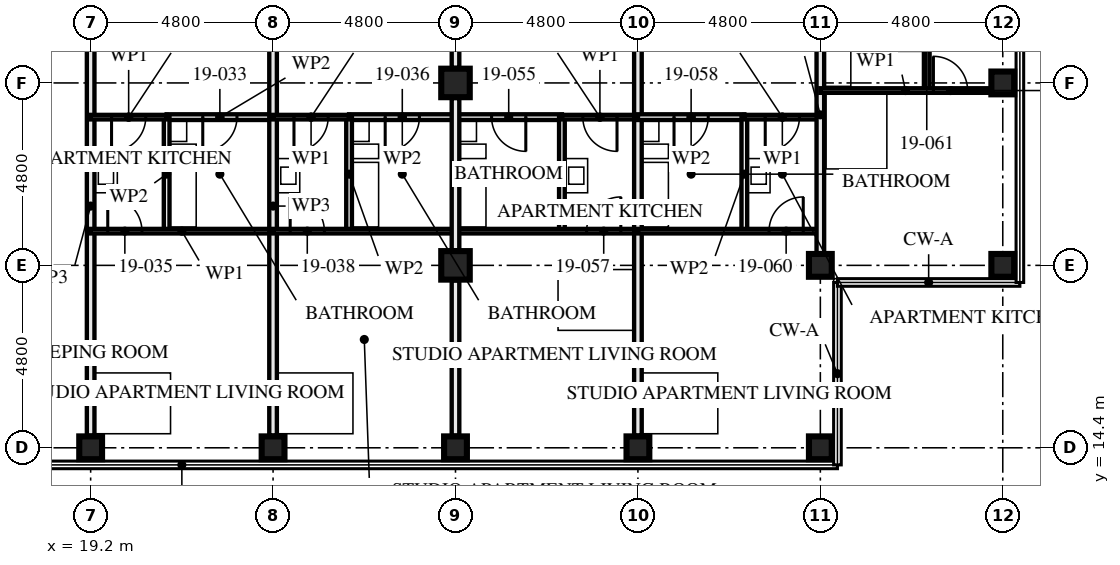
"""IFC4 building model, lengths in metres.
Left out: names, types, materials, properties, quantities, classifications, styles, units other than length and angle.
Written with IfcOpenShell. Run it as: python <this file> out.ifc"""

import sys

from ifc_helpers import new_model, si_unit, direction, frame, frame_2d, origin, origin_2d, place, context, subcontext, project, spatial, rectangle, hollow_rectangle, extrude, element, fill, save


model = new_model("IFC4")
c1 = context("Model", 3, precision=1e-05, world=origin(), true_north=direction((0.0, 1.0)))
c2 = subcontext(c1, "Body", "Model", "MODEL_VIEW")
j1 = project(units=[si_unit("LENGTHUNIT", "METRE"), si_unit("PLANEANGLEUNIT", "RADIAN")], contexts=[c1])
p1 = place(None, origin())
s1 = spatial("IfcSite", under=j1, at=p1, CompositionType="ELEMENT")
p2 = place(p1, origin())
s2 = spatial("IfcBuilding", under=s1, at=p2, CompositionType="ELEMENT")
p3 = place(p2, frame((0.0, 0.0, 72.5)))
s3 = spatial("IfcBuildingStorey", under=s2, at=p3, CompositionType="ELEMENT", Elevation=72.5)
for number, where, z_axis, x_axis in (
    (1, (19.2, 14.4, 0.0), (0.0, 0.0, 1.0), (0.0, 1.0, 0.0)),
    (2, (24.0, 14.4, 0.0), (0.0, 0.0, 1.0), (0.0, 1.0, 0.0)),
    (3, (28.8, 14.4, 0.0), (0.0, 0.0, 1.0), (0.0, 1.0, 0.0)),
):
    element("IfcColumn", number, at=place(p3, frame(where, z_axis=z_axis, x_axis=x_axis)), inside=s3, PredefinedType="COLUMN", context=c2, shape_type="SweptSolid", body=[
        extrude(hollow_rectangle(XDim=0.6, YDim=0.6, WallThickness=0.08, at=origin_2d()), origin(), (0.0, 0.0, 1.0), 3.5),
    ])
for number, where, z_axis, x_axis in (
    (4, (28.8, 19.2, 0.0), (0.0, 0.0, 1.0), (1.0, 0.0, 0.0)),
    (5, (28.8, 24.0, 0.0), (0.0, 0.0, 1.0), (1.0, 0.0, 0.0)),
):
    element("IfcColumn", number, at=place(p3, frame(where, z_axis=z_axis, x_axis=x_axis)), inside=s3, PredefinedType="COLUMN", context=c2, shape_type="SweptSolid", body=[
        extrude(hollow_rectangle(XDim=0.75, YDim=0.75, WallThickness=0.08, at=origin_2d()), origin(), (0.0, 0.0, 1.0), 3.5),
    ])
for number, where, z_axis, x_axis in (
    (6, (33.6, 14.4, 0.0), (0.0, 0.0, 1.0), (0.0, 1.0, 0.0)),
    (7, (38.4, 14.4, 0.0), (0.0, 0.0, 1.0), (0.0, 1.0, 0.0)),
    (8, (38.4, 19.2, 0.0), (0.0, 0.0, 1.0), (0.0, 1.0, 0.0)),
    (9, (43.2, 19.2, 0.0), (0.0, 0.0, 1.0), (0.0, 1.0, 0.0)),
    (10, (43.2, 24.0, 0.0), (0.0, 0.0, 1.0), (1.0, 0.0, 0.0)),
):
    element("IfcColumn", number, at=place(p3, frame(where, z_axis=z_axis, x_axis=x_axis)), inside=s3, PredefinedType="COLUMN", context=c2, shape_type="SweptSolid", body=[
        extrude(hollow_rectangle(XDim=0.6, YDim=0.6, WallThickness=0.08, at=origin_2d()), origin(), (0.0, 0.0, 1.0), 3.5),
    ])
p4 = place(p3, frame((19.2, 14.72, 0.0), z_axis=(0.0, 0.0, 1.0), x_axis=(0.0, 1.0, 0.0)))
e11 = element("IfcWall", 11, at=p4, inside=s3, PredefinedType="PARTITIONING", context=c2, shape_type="SweptSolid", body=[
    extrude(rectangle(XDim=12.08, YDim=0.2, at=frame_2d((6.04, 0.0))), origin(), (0.0, 0.0, 1.0), 2.55),
])
p5 = place(p3, frame((21.2, 20.1, 0.0), z_axis=(0.0, 0.0, 1.0), x_axis=(0.0, 1.0, 0.0)))
e12 = element("IfcWall", 12, at=p5, inside=s3, PredefinedType="PARTITIONING", context=c2, shape_type="SweptSolid", body=[
    extrude(rectangle(XDim=3.0, YDim=0.15, at=frame_2d((1.5, 0.0))), origin(), (0.0, 0.0, 1.0), 3.33),
])
p6 = place(p3, frame((21.2, 23.1, 0.0), z_axis=(0.0, 0.0, 1.0), x_axis=(1.0, 0.0, 0.0)))
e13 = element("IfcWall", 13, at=p6, inside=s3, PredefinedType="PARTITIONING", context=c2, shape_type="SweptSolid", body=[
    extrude(rectangle(XDim=2.8, YDim=0.15, at=frame_2d((1.4, 0.0))), origin(), (0.0, 0.0, 1.0), 3.33),
])
p7 = place(p6, frame((0.95, 0.0, 0.0)))
e14 = element("IfcOpeningElement", 14, at=p7, cuts=e13, PredefinedType="OPENING", context=c2, shape_type="SweptSolid", body=[
    extrude(rectangle(XDim=0.9, YDim=2.1, at=frame_2d((0.45, 1.05))), frame((0.0, 0.085, 0.0), z_axis=(0.0, -1.0, 0.0), x_axis=(1.0, 0.0, 0.0)), (0.0, 0.0, 1.0), 0.171),
])
p8 = place(p3, frame((19.2, 23.1, 0.0), z_axis=(0.0, 0.0, 1.0), x_axis=(1.0, 0.0, 0.0)))
e15 = element("IfcWall", 15, at=p8, inside=s3, PredefinedType="PARTITIONING", context=c2, shape_type="SweptSolid", body=[
    extrude(rectangle(XDim=2.0, YDim=0.12, at=frame_2d((1.0, 0.0))), origin(), (0.0, 0.0, 1.0), 3.33),
])
p9 = place(p8, frame((0.55, 0.0, 0.0)))
e16 = element("IfcOpeningElement", 16, at=p9, cuts=e15, PredefinedType="OPENING", context=c2, shape_type="SweptSolid", body=[
    extrude(rectangle(XDim=0.9, YDim=2.1, at=frame_2d((0.45, 1.05))), frame((0.0, 0.071, 0.0), z_axis=(0.0, -1.0, 0.0), x_axis=(1.0, 0.0, 0.0)), (0.0, 0.0, 1.0), 0.141),
])
p10 = place(p3, frame((19.2, 20.1, 0.0), z_axis=(0.0, 0.0, 1.0), x_axis=(1.0, 0.0, 0.0)))
e17 = element("IfcWall", 17, at=p10, inside=s3, PredefinedType="PARTITIONING", context=c2, shape_type="SweptSolid", body=[
    extrude(rectangle(XDim=4.8, YDim=0.12, at=frame_2d((2.4, 0.0))), origin(), (0.0, 0.0, 1.0), 3.33),
])
p11 = place(p10, frame((0.45, 0.0, 0.0)))
e18 = element("IfcOpeningElement", 18, at=p11, cuts=e17, PredefinedType="OPENING", context=c2, shape_type="SweptSolid", body=[
    extrude(rectangle(XDim=0.9, YDim=2.1, at=frame_2d((0.45, 1.05))), frame((0.0, 0.071, 0.0), z_axis=(0.0, -1.0, 0.0), x_axis=(1.0, 0.0, 0.0)), (0.0, 0.0, 1.0), 0.141),
])
p12 = place(p3, frame((24.0, 14.72, 0.0), z_axis=(0.0, 0.0, 1.0), x_axis=(0.0, 1.0, 0.0)))
e19 = element("IfcWall", 19, at=p12, inside=s3, PredefinedType="PARTITIONING", context=c2, shape_type="SweptSolid", body=[
    extrude(rectangle(XDim=12.08, YDim=0.2, at=frame_2d((6.04, 0.0))), origin(), (0.0, 0.0, 1.0), 2.55),
])
p13 = place(p3, frame((26.0, 20.1, 0.0), z_axis=(0.0, 0.0, 1.0), x_axis=(0.0, 1.0, 0.0)))
e20 = element("IfcWall", 20, at=p13, inside=s3, PredefinedType="PARTITIONING", context=c2, shape_type="SweptSolid", body=[
    extrude(rectangle(XDim=3.0, YDim=0.15, at=frame_2d((1.5, 0.0))), origin(), (0.0, 0.0, 1.0), 3.33),
])
p14 = place(p3, frame((26.0, 23.1, 0.0), z_axis=(0.0, 0.0, 1.0), x_axis=(1.0, 0.0, 0.0)))
e21 = element("IfcWall", 21, at=p14, inside=s3, PredefinedType="PARTITIONING", context=c2, shape_type="SweptSolid", body=[
    extrude(rectangle(XDim=2.8, YDim=0.15, at=frame_2d((1.4, 0.0))), origin(), (0.0, 0.0, 1.0), 3.33),
])
p15 = place(p14, frame((0.95, 0.0, 0.0)))
e22 = element("IfcOpeningElement", 22, at=p15, cuts=e21, PredefinedType="OPENING", context=c2, shape_type="SweptSolid", body=[
    extrude(rectangle(XDim=0.9, YDim=2.1, at=frame_2d((0.45, 1.05))), frame((0.0, 0.085, 0.0), z_axis=(0.0, -1.0, 0.0), x_axis=(1.0, 0.0, 0.0)), (0.0, 0.0, 1.0), 0.171),
])
p16 = place(p3, frame((24.0, 23.1, 0.0), z_axis=(0.0, 0.0, 1.0), x_axis=(1.0, 0.0, 0.0)))
e23 = element("IfcWall", 23, at=p16, inside=s3, PredefinedType="PARTITIONING", context=c2, shape_type="SweptSolid", body=[
    extrude(rectangle(XDim=2.0, YDim=0.12, at=frame_2d((1.0, 0.0))), origin(), (0.0, 0.0, 1.0), 3.33),
])
p17 = place(p16, frame((0.55, 0.0, 0.0)))
e24 = element("IfcOpeningElement", 24, at=p17, cuts=e23, PredefinedType="OPENING", context=c2, shape_type="SweptSolid", body=[
    extrude(rectangle(XDim=0.9, YDim=2.1, at=frame_2d((0.45, 1.05))), frame((0.0, 0.071, 0.0), z_axis=(0.0, -1.0, 0.0), x_axis=(1.0, 0.0, 0.0)), (0.0, 0.0, 1.0), 0.141),
])
p18 = place(p3, frame((24.0, 20.1, 0.0), z_axis=(0.0, 0.0, 1.0), x_axis=(1.0, 0.0, 0.0)))
e25 = element("IfcWall", 25, at=p18, inside=s3, PredefinedType="PARTITIONING", context=c2, shape_type="SweptSolid", body=[
    extrude(rectangle(XDim=4.8, YDim=0.12, at=frame_2d((2.4, 0.0))), origin(), (0.0, 0.0, 1.0), 3.33),
])
p19 = place(p18, frame((0.45, 0.0, 0.0)))
e26 = element("IfcOpeningElement", 26, at=p19, cuts=e25, PredefinedType="OPENING", context=c2, shape_type="SweptSolid", body=[
    extrude(rectangle(XDim=0.9, YDim=2.1, at=frame_2d((0.45, 1.05))), frame((0.0, 0.071, 0.0), z_axis=(0.0, -1.0, 0.0), x_axis=(1.0, 0.0, 0.0)), (0.0, 0.0, 1.0), 0.141),
])
p20 = place(p3, frame((31.6, 20.1, 0.0), z_axis=(0.0, 0.0, 1.0), x_axis=(0.0, 1.0, 0.0)))
e27 = element("IfcWall", 27, at=p20, inside=s3, PredefinedType="PARTITIONING", context=c2, shape_type="SweptSolid", body=[
    extrude(rectangle(XDim=3.0, YDim=0.15, at=frame_2d((1.5, 0.0))), origin(), (0.0, 0.0, 1.0), 3.33),
])
p21 = place(p3, frame((28.8, 23.1, 0.0), z_axis=(0.0, 0.0, 1.0), x_axis=(1.0, 0.0, 0.0)))
e28 = element("IfcWall", 28, at=p21, inside=s3, PredefinedType="PARTITIONING", context=c2, shape_type="SweptSolid", body=[
    extrude(rectangle(XDim=2.8, YDim=0.15, at=frame_2d((1.4, 0.0))), origin(), (0.0, 0.0, 1.0), 3.33),
])
p22 = place(p21, frame((0.95, 0.0, 0.0)))
e29 = element("IfcOpeningElement", 29, at=p22, cuts=e28, PredefinedType="OPENING", context=c2, shape_type="SweptSolid", body=[
    extrude(rectangle(XDim=0.9, YDim=2.1, at=frame_2d((0.45, 1.05))), frame((0.0, 0.085, 0.0), z_axis=(0.0, -1.0, 0.0), x_axis=(1.0, 0.0, 0.0)), (0.0, 0.0, 1.0), 0.171),
])
p23 = place(p3, frame((31.6, 23.1, 0.0), z_axis=(0.0, 0.0, 1.0), x_axis=(1.0, 0.0, 0.0)))
e30 = element("IfcWall", 30, at=p23, inside=s3, PredefinedType="PARTITIONING", context=c2, shape_type="SweptSolid", body=[
    extrude(rectangle(XDim=2.0, YDim=0.12, at=frame_2d((1.0, 0.0))), origin(), (0.0, 0.0, 1.0), 3.33),
])
p24 = place(p23, frame((0.55, 0.0, 0.0)))
e31 = element("IfcOpeningElement", 31, at=p24, cuts=e30, PredefinedType="OPENING", context=c2, shape_type="SweptSolid", body=[
    extrude(rectangle(XDim=0.9, YDim=2.1, at=frame_2d((0.45, 1.05))), frame((0.0, 0.071, 0.0), z_axis=(0.0, -1.0, 0.0), x_axis=(1.0, 0.0, 0.0)), (0.0, 0.0, 1.0), 0.141),
])
p25 = place(p3, frame((28.8, 20.1, 0.0), z_axis=(0.0, 0.0, 1.0), x_axis=(1.0, 0.0, 0.0)))
e32 = element("IfcWall", 32, at=p25, inside=s3, PredefinedType="PARTITIONING", context=c2, shape_type="SweptSolid", body=[
    extrude(rectangle(XDim=4.8, YDim=0.12, at=frame_2d((2.4, 0.0))), origin(), (0.0, 0.0, 1.0), 3.33),
])
p26 = place(p25, frame((3.45, 0.0, 0.0)))
e33 = element("IfcOpeningElement", 33, at=p26, cuts=e32, PredefinedType="OPENING", context=c2, shape_type="SweptSolid", body=[
    extrude(rectangle(XDim=0.9, YDim=2.1, at=frame_2d((0.45, 1.05))), frame((0.0, 0.071, 0.0), z_axis=(0.0, -1.0, 0.0), x_axis=(1.0, 0.0, 0.0)), (0.0, 0.0, 1.0), 0.141),
])
p27 = place(p3, frame((33.6, 14.72, 0.0), z_axis=(0.0, 0.0, 1.0), x_axis=(0.0, 1.0, 0.0)))
e34 = element("IfcWall", 34, at=p27, inside=s3, PredefinedType="PARTITIONING", context=c2, shape_type="SweptSolid", body=[
    extrude(rectangle(XDim=12.08, YDim=0.2, at=frame_2d((6.04, 0.0))), origin(), (0.0, 0.0, 1.0), 2.55),
])
p28 = place(p3, frame((36.4, 20.1, 0.0), z_axis=(0.0, 0.0, 1.0), x_axis=(0.0, 1.0, 0.0)))
e35 = element("IfcWall", 35, at=p28, inside=s3, PredefinedType="PARTITIONING", context=c2, shape_type="SweptSolid", body=[
    extrude(rectangle(XDim=3.0, YDim=0.15, at=frame_2d((1.5, 0.0))), origin(), (0.0, 0.0, 1.0), 3.33),
])
p29 = place(p3, frame((33.6, 23.1, 0.0), z_axis=(0.0, 0.0, 1.0), x_axis=(1.0, 0.0, 0.0)))
e36 = element("IfcWall", 36, at=p29, inside=s3, PredefinedType="PARTITIONING", context=c2, shape_type="SweptSolid", body=[
    extrude(rectangle(XDim=2.8, YDim=0.15, at=frame_2d((1.4, 0.0))), origin(), (0.0, 0.0, 1.0), 3.33),
])
p30 = place(p29, frame((0.95, 0.0, 0.0)))
e37 = element("IfcOpeningElement", 37, at=p30, cuts=e36, PredefinedType="OPENING", context=c2, shape_type="SweptSolid", body=[
    extrude(rectangle(XDim=0.9, YDim=2.1, at=frame_2d((0.45, 1.05))), frame((0.0, 0.085, 0.0), z_axis=(0.0, -1.0, 0.0), x_axis=(1.0, 0.0, 0.0)), (0.0, 0.0, 1.0), 0.171),
])
p31 = place(p3, frame((36.4, 23.1, 0.0), z_axis=(0.0, 0.0, 1.0), x_axis=(1.0, 0.0, 0.0)))
e38 = element("IfcWall", 38, at=p31, inside=s3, PredefinedType="PARTITIONING", context=c2, shape_type="SweptSolid", body=[
    extrude(rectangle(XDim=2.0, YDim=0.12, at=frame_2d((1.0, 0.0))), origin(), (0.0, 0.0, 1.0), 3.33),
])
p32 = place(p31, frame((0.55, 0.0, 0.0)))
e39 = element("IfcOpeningElement", 39, at=p32, cuts=e38, PredefinedType="OPENING", context=c2, shape_type="SweptSolid", body=[
    extrude(rectangle(XDim=0.9, YDim=2.1, at=frame_2d((0.45, 1.05))), frame((0.0, 0.071, 0.0), z_axis=(0.0, -1.0, 0.0), x_axis=(1.0, 0.0, 0.0)), (0.0, 0.0, 1.0), 0.141),
])
p33 = place(p3, frame((33.6, 20.1, 0.0), z_axis=(0.0, 0.0, 1.0), x_axis=(1.0, 0.0, 0.0)))
e40 = element("IfcWall", 40, at=p33, inside=s3, PredefinedType="PARTITIONING", context=c2, shape_type="SweptSolid", body=[
    extrude(rectangle(XDim=4.8, YDim=0.12, at=frame_2d((2.4, 0.0))), origin(), (0.0, 0.0, 1.0), 3.33),
])
p34 = place(p33, frame((3.45, 0.0, 0.0)))
e41 = element("IfcOpeningElement", 41, at=p34, cuts=e40, PredefinedType="OPENING", context=c2, shape_type="SweptSolid", body=[
    extrude(rectangle(XDim=0.9, YDim=2.1, at=frame_2d((0.45, 1.05))), frame((0.0, 0.071, 0.0), z_axis=(0.0, -1.0, 0.0), x_axis=(1.0, 0.0, 0.0)), (0.0, 0.0, 1.0), 0.141),
])
p35 = place(p3, frame((38.4, 19.52, 0.0), z_axis=(0.0, 0.0, 1.0), x_axis=(0.0, 1.0, 0.0)))
e42 = element("IfcWall", 42, at=p35, inside=s3, PredefinedType="PARTITIONING", context=c2, shape_type="SweptSolid", body=[
    extrude(rectangle(XDim=7.28, YDim=0.2, at=frame_2d((3.64, 0.0))), origin(), (0.0, 0.0, 1.0), 2.55),
])
p36 = place(p3, frame((41.2, 23.8, 0.0), z_axis=(0.0, 0.0, 1.0), x_axis=(0.0, 1.0, 0.0)))
e43 = element("IfcWall", 43, at=p36, inside=s3, PredefinedType="PARTITIONING", context=c2, shape_type="SweptSolid", body=[
    extrude(rectangle(XDim=3.0, YDim=0.15, at=frame_2d((1.5, 0.0))), origin(), (0.0, 0.0, 1.0), 2.55),
])
p37 = place(p36, frame((1.05, 0.0, 0.0)))
e44 = element("IfcOpeningElement", 44, at=p37, cuts=e43, PredefinedType="OPENING", context=c2, shape_type="SweptSolid", body=[
    extrude(rectangle(XDim=0.9, YDim=2.1, at=frame_2d((0.45, 1.05))), frame((0.0, 0.085, 0.0), z_axis=(0.0, -1.0, 0.0), x_axis=(1.0, 0.0, 0.0)), (0.0, 0.0, 1.0), 0.171),
])
p38 = place(p3, frame((38.4, 23.8, 0.0), z_axis=(0.0, 0.0, 1.0), x_axis=(1.0, 0.0, 0.0)))
e45 = element("IfcWall", 45, at=p38, inside=s3, PredefinedType="PARTITIONING", context=c2, shape_type="SweptSolid", body=[
    extrude(rectangle(XDim=4.48, YDim=0.12, at=frame_2d((2.24, 0.0))), origin(), (0.0, 0.0, 1.0), 3.33),
])
p39 = place(p38, frame((2.975, 0.0, 0.0)))
e46 = element("IfcOpeningElement", 46, at=p39, cuts=e45, PredefinedType="OPENING", context=c2, shape_type="SweptSolid", body=[
    extrude(rectangle(XDim=0.9, YDim=2.1, at=frame_2d((0.45, 1.05))), frame((0.0, 0.071, 0.0), z_axis=(0.0, -1.0, 0.0), x_axis=(1.0, 0.0, 0.0)), (0.0, 0.0, 1.0), 0.141),
])
p40 = place(p3, frame((28.8, 14.72, 0.0), z_axis=(0.0, 0.0, 1.0), x_axis=(0.0, 1.0, 0.0)))
e47 = element("IfcWall", 47, at=p40, inside=s3, PredefinedType="PARTITIONING", context=c2, shape_type="SweptSolid", body=[
    extrude(rectangle(XDim=4.085, YDim=0.2, at=frame_2d((2.042, 0.0))), origin(), (0.0, 0.0, 1.0), 2.32),
])
p41 = place(p3, frame((28.8, 19.595, 0.0), z_axis=(0.0, 0.0, 1.0), x_axis=(0.0, 1.0, 0.0)))
e48 = element("IfcWall", 48, at=p41, inside=s3, PredefinedType="PARTITIONING", context=c2, shape_type="SweptSolid", body=[
    extrude(rectangle(XDim=4.01, YDim=0.2, at=frame_2d((2.005, 0.0))), origin(), (0.0, 0.0, 1.0), 2.32),
])
p42 = place(p3, frame((28.8, 24.395, 0.0), z_axis=(0.0, 0.0, 1.0), x_axis=(0.0, 1.0, 0.0)))
e49 = element("IfcWall", 49, at=p42, inside=s3, PredefinedType="PARTITIONING", context=c2, shape_type="SweptSolid", body=[
    extrude(rectangle(XDim=2.505, YDim=0.2, at=frame_2d((1.252, 0.0))), origin(), (0.0, 0.0, 1.0), 2.32),
])
p43 = place(p7, frame((0.9, 0.0, 0.0), z_axis=(0.0, 0.0, 1.0), x_axis=(-1.0, 0.0, 0.0)))
e50 = element("IfcDoor", 50, at=p43, inside=s3, OperationType="SINGLE_SWING_LEFT", PredefinedType="DOOR", context=c2, shape_type="SweptSolid", body=[
    extrude(rectangle(XDim=0.9, YDim=2.1, at=frame_2d((0.45, 1.05))), frame((0.0, 0.022, 0.0), z_axis=(0.0, -1.0, 0.0), x_axis=(1.0, 0.0, 0.0)), (0.0, 0.0, 1.0), 0.044),
])
fill(e14, e50)
p44 = place(p9, frame((0.9, 0.0, 0.0), z_axis=(0.0, 0.0, 1.0), x_axis=(-1.0, 0.0, 0.0)))
e51 = element("IfcDoor", 51, at=p44, inside=s3, OperationType="SINGLE_SWING_LEFT", PredefinedType="DOOR", context=c2, shape_type="SweptSolid", body=[
    extrude(rectangle(XDim=0.9, YDim=2.1, at=frame_2d((0.45, 1.05))), frame((0.0, 0.022, 0.0), z_axis=(0.0, -1.0, 0.0), x_axis=(1.0, 0.0, 0.0)), (0.0, 0.0, 1.0), 0.044),
])
fill(e16, e51)
p45 = place(p11, origin())
e52 = element("IfcDoor", 52, at=p45, inside=s3, OperationType="SINGLE_SWING_RIGHT", PredefinedType="DOOR", context=c2, shape_type="SweptSolid", body=[
    extrude(rectangle(XDim=0.9, YDim=2.1, at=frame_2d((0.45, 1.05))), frame((0.0, 0.022, 0.0), z_axis=(0.0, -1.0, 0.0), x_axis=(1.0, 0.0, 0.0)), (0.0, 0.0, 1.0), 0.044),
])
fill(e18, e52)
p46 = place(p15, frame((0.9, 0.0, 0.0), z_axis=(0.0, 0.0, 1.0), x_axis=(-1.0, 0.0, 0.0)))
e53 = element("IfcDoor", 53, at=p46, inside=s3, OperationType="SINGLE_SWING_LEFT", PredefinedType="DOOR", context=c2, shape_type="SweptSolid", body=[
    extrude(rectangle(XDim=0.9, YDim=2.1, at=frame_2d((0.45, 1.05))), frame((0.0, 0.022, 0.0), z_axis=(0.0, -1.0, 0.0), x_axis=(1.0, 0.0, 0.0)), (0.0, 0.0, 1.0), 0.044),
])
fill(e22, e53)
p47 = place(p17, frame((0.9, 0.0, 0.0), z_axis=(0.0, 0.0, 1.0), x_axis=(-1.0, 0.0, 0.0)))
e54 = element("IfcDoor", 54, at=p47, inside=s3, OperationType="SINGLE_SWING_LEFT", PredefinedType="DOOR", context=c2, shape_type="SweptSolid", body=[
    extrude(rectangle(XDim=0.9, YDim=2.1, at=frame_2d((0.45, 1.05))), frame((0.0, 0.022, 0.0), z_axis=(0.0, -1.0, 0.0), x_axis=(1.0, 0.0, 0.0)), (0.0, 0.0, 1.0), 0.044),
])
fill(e24, e54)
p48 = place(p19, origin())
e55 = element("IfcDoor", 55, at=p48, inside=s3, OperationType="SINGLE_SWING_RIGHT", PredefinedType="DOOR", context=c2, shape_type="SweptSolid", body=[
    extrude(rectangle(XDim=0.9, YDim=2.1, at=frame_2d((0.45, 1.05))), frame((0.0, 0.022, 0.0), z_axis=(0.0, -1.0, 0.0), x_axis=(1.0, 0.0, 0.0)), (0.0, 0.0, 1.0), 0.044),
])
fill(e26, e55)
p49 = place(p22, frame((0.9, 0.0, 0.0), z_axis=(0.0, 0.0, 1.0), x_axis=(-1.0, 0.0, 0.0)))
e56 = element("IfcDoor", 56, at=p49, inside=s3, OperationType="SINGLE_SWING_RIGHT", PredefinedType="DOOR", context=c2, shape_type="SweptSolid", body=[
    extrude(rectangle(XDim=0.9, YDim=2.1, at=frame_2d((0.45, 1.05))), frame((0.0, 0.022, 0.0), z_axis=(0.0, -1.0, 0.0), x_axis=(1.0, 0.0, 0.0)), (0.0, 0.0, 1.0), 0.044),
])
fill(e29, e56)
p50 = place(p24, frame((0.9, 0.0, 0.0), z_axis=(0.0, 0.0, 1.0), x_axis=(-1.0, 0.0, 0.0)))
e57 = element("IfcDoor", 57, at=p50, inside=s3, OperationType="SINGLE_SWING_RIGHT", PredefinedType="DOOR", context=c2, shape_type="SweptSolid", body=[
    extrude(rectangle(XDim=0.9, YDim=2.1, at=frame_2d((0.45, 1.05))), frame((0.0, 0.022, 0.0), z_axis=(0.0, -1.0, 0.0), x_axis=(1.0, 0.0, 0.0)), (0.0, 0.0, 1.0), 0.044),
])
fill(e31, e57)
p51 = place(p26, origin())
e58 = element("IfcDoor", 58, at=p51, inside=s3, OperationType="SINGLE_SWING_LEFT", PredefinedType="DOOR", context=c2, shape_type="SweptSolid", body=[
    extrude(rectangle(XDim=0.9, YDim=2.1, at=frame_2d((0.45, 1.05))), frame((0.0, 0.022, 0.0), z_axis=(0.0, -1.0, 0.0), x_axis=(1.0, 0.0, 0.0)), (0.0, 0.0, 1.0), 0.044),
])
fill(e33, e58)
p52 = place(p30, frame((0.9, 0.0, 0.0), z_axis=(0.0, 0.0, 1.0), x_axis=(-1.0, 0.0, 0.0)))
e59 = element("IfcDoor", 59, at=p52, inside=s3, OperationType="SINGLE_SWING_LEFT", PredefinedType="DOOR", context=c2, shape_type="SweptSolid", body=[
    extrude(rectangle(XDim=0.9, YDim=2.1, at=frame_2d((0.45, 1.05))), frame((0.0, 0.022, 0.0), z_axis=(0.0, -1.0, 0.0), x_axis=(1.0, 0.0, 0.0)), (0.0, 0.0, 1.0), 0.044),
])
fill(e37, e59)
p53 = place(p32, frame((0.9, 0.0, 0.0), z_axis=(0.0, 0.0, 1.0), x_axis=(-1.0, 0.0, 0.0)))
e60 = element("IfcDoor", 60, at=p53, inside=s3, OperationType="SINGLE_SWING_LEFT", PredefinedType="DOOR", context=c2, shape_type="SweptSolid", body=[
    extrude(rectangle(XDim=0.9, YDim=2.1, at=frame_2d((0.45, 1.05))), frame((0.0, 0.022, 0.0), z_axis=(0.0, -1.0, 0.0), x_axis=(1.0, 0.0, 0.0)), (0.0, 0.0, 1.0), 0.044),
])
fill(e39, e60)
p54 = place(p34, origin())
e61 = element("IfcDoor", 61, at=p54, inside=s3, OperationType="SINGLE_SWING_LEFT", PredefinedType="DOOR", context=c2, shape_type="SweptSolid", body=[
    extrude(rectangle(XDim=0.9, YDim=2.1, at=frame_2d((0.45, 1.05))), frame((0.0, 0.022, 0.0), z_axis=(0.0, -1.0, 0.0), x_axis=(1.0, 0.0, 0.0)), (0.0, 0.0, 1.0), 0.044),
])
fill(e41, e61)
p55 = place(p39, origin())
e62 = element("IfcDoor", 62, at=p55, inside=s3, OperationType="SINGLE_SWING_RIGHT", PredefinedType="DOOR", context=c2, shape_type="SweptSolid", body=[
    extrude(rectangle(XDim=0.9, YDim=2.1, at=frame_2d((0.45, 1.05))), frame((0.0, 0.022, 0.0), z_axis=(0.0, -1.0, 0.0), x_axis=(1.0, 0.0, 0.0)), (0.0, 0.0, 1.0), 0.044),
])
fill(e46, e62)
save(model, sys.argv[1])
